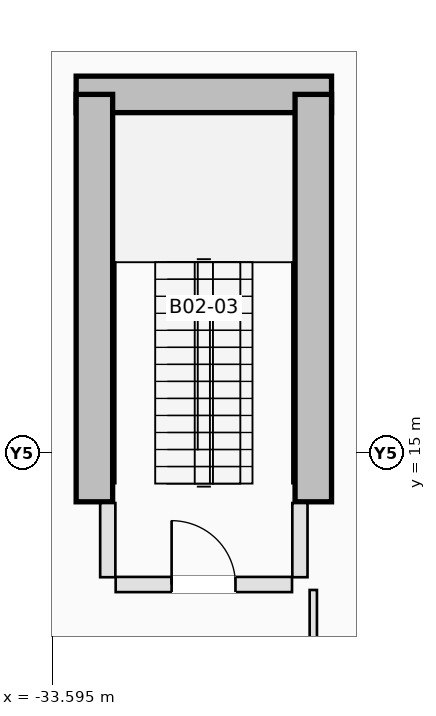
"""IFC4 building model, lengths in metres.
Left out: names, types, materials, properties, quantities, classifications, styles, units other than length and angle.
Written with IfcOpenShell. Run it as: python <this file> out.ifc"""

import sys

from ifc_helpers import new_model, si_unit, direction, frame, frame_2d, origin, place, context, subcontext, project, spatial, rectangle, extrude, element, fill, save


model = new_model("IFC4")
c1 = context("Model", 3, precision=1e-05, world=origin(), true_north=direction((0.0, 1.0)))
c2 = subcontext(c1, "Body", "Model", "MODEL_VIEW")
j1 = project(units=[si_unit("LENGTHUNIT", "METRE"), si_unit("PLANEANGLEUNIT", "RADIAN")], contexts=[c1])
p1 = place(None, origin())
s1 = spatial("IfcSite", under=j1, at=p1, CompositionType="ELEMENT")
p2 = place(p1, origin())
s2 = spatial("IfcBuilding", under=s1, at=p2, CompositionType="ELEMENT")
p3 = place(p2, frame((0.0, 0.0, -10.0)))
s3 = spatial("IfcBuildingStorey", under=s2, at=p3, CompositionType="ELEMENT", Elevation=-10.0)
p4 = place(p3, frame((-33.2, 20.9, 0.0), z_axis=(0.0, 0.0, 1.0), x_axis=(1.0, 0.0, 0.0)))
e1 = element("IfcWall", 1, at=p4, inside=s3, PredefinedType="SHEAR", context=c2, shape_type="SweptSolid", body=[
    extrude(rectangle(XDim=4.2, YDim=0.6, at=frame_2d((2.1, 0.0))), origin(), (0.0, 0.0, 1.0), 5.0),
])
for number, where, z_axis, x_axis in (
    (2, (-32.9, 14.2, 0.0), (0.0, 0.0, 1.0), (0.0, 1.0, 0.0)),
    (3, (-29.3, 14.2, 0.0), (0.0, 0.0, 1.0), (0.0, 1.0, 0.0)),
):
    element("IfcWall", number, at=place(p3, frame(where, z_axis=z_axis, x_axis=x_axis)), inside=s3, PredefinedType="SHEAR", context=c2, shape_type="SweptSolid", body=[
        extrude(rectangle(XDim=6.7, YDim=0.6, at=frame_2d((3.35, 0.0))), origin(), (0.0, 0.0, 1.0), 5.0),
    ])
p5 = place(p3, frame((-32.55, 12.84, 0.0), z_axis=(0.0, 0.0, 1.0), x_axis=(1.0, 0.0, 0.0)))
e4 = element("IfcWall", 4, at=p5, inside=s3, PredefinedType="PARTITIONING", context=c2, shape_type="SweptSolid", body=[
    extrude(rectangle(XDim=2.9, YDim=0.25, at=frame_2d((1.45, 0.0))), origin(), (0.0, 0.0, 1.0), 4.68),
])
p6 = place(p5, frame((0.92, 0.0, 0.0)))
e5 = element("IfcOpeningElement", 5, at=p6, cuts=e4, PredefinedType="OPENING", context=c2, shape_type="SweptSolid", body=[
    extrude(rectangle(XDim=1.05, YDim=2.15, at=frame_2d((0.525, 1.075))), frame((0.0, 0.135, 0.0), z_axis=(0.0, -1.0, 0.0), x_axis=(1.0, 0.0, 0.0)), (0.0, 0.0, 1.0), 0.27),
])
for number, where, z_axis, x_axis in (
    (6, (-32.68, 12.96, 0.0), (0.0, 0.0, 1.0), (0.0, 1.0, 0.0)),
    (7, (-29.52, 12.96, 0.0), (0.0, 0.0, 1.0), (0.0, 1.0, 0.0)),
):
    element("IfcWall", number, at=place(p3, frame(where, z_axis=z_axis, x_axis=x_axis)), inside=s3, PredefinedType="PARTITIONING", context=c2, shape_type="SweptSolid", body=[
        extrude(rectangle(XDim=1.22, YDim=0.25, at=frame_2d((0.61, 0.0))), origin(), (0.0, 0.0, 1.0), 4.68),
    ])
p7 = place(p3, frame((-29.3, -2.338, 0.0), z_axis=(0.0, 0.0, 1.0), x_axis=(0.0, 1.0, 0.0)))
e8 = element("IfcWall", 8, at=p7, inside=s3, PredefinedType="PARTITIONING", context=c2, shape_type="SweptSolid", body=[
    extrude(rectangle(XDim=15.088, YDim=0.12, at=frame_2d((7.544, 0.0))), origin(), (0.0, 0.0, 1.0), 4.68),
])
p8 = place(p7, frame((7.538, 0.0, 0.0)))
e9 = element("IfcOpeningElement", 9, at=p8, cuts=e8, PredefinedType="OPENING", context=c2, shape_type="SweptSolid", body=[
    extrude(rectangle(XDim=1.1, YDim=2.15, at=frame_2d((0.55, 1.075))), frame((0.0, 0.07, 0.0), z_axis=(0.0, -1.0, 0.0), x_axis=(1.0, 0.0, 0.0)), (0.0, 0.0, 1.0), 0.14),
])
p9 = place(p6, origin())
e10 = element("IfcDoor", 10, at=p9, inside=s3, OperationType="SINGLE_SWING_LEFT", PredefinedType="DOOR", context=c2, shape_type="SweptSolid", body=[
    extrude(rectangle(XDim=1.05, YDim=2.15, at=frame_2d((0.525, 1.075))), frame((0.0, 0.025, 0.0), z_axis=(0.0, -1.0, 0.0), x_axis=(1.0, 0.0, 0.0)), (0.0, 0.0, 1.0), 0.05),
])
fill(e5, e10)
save(model, sys.argv[1])
